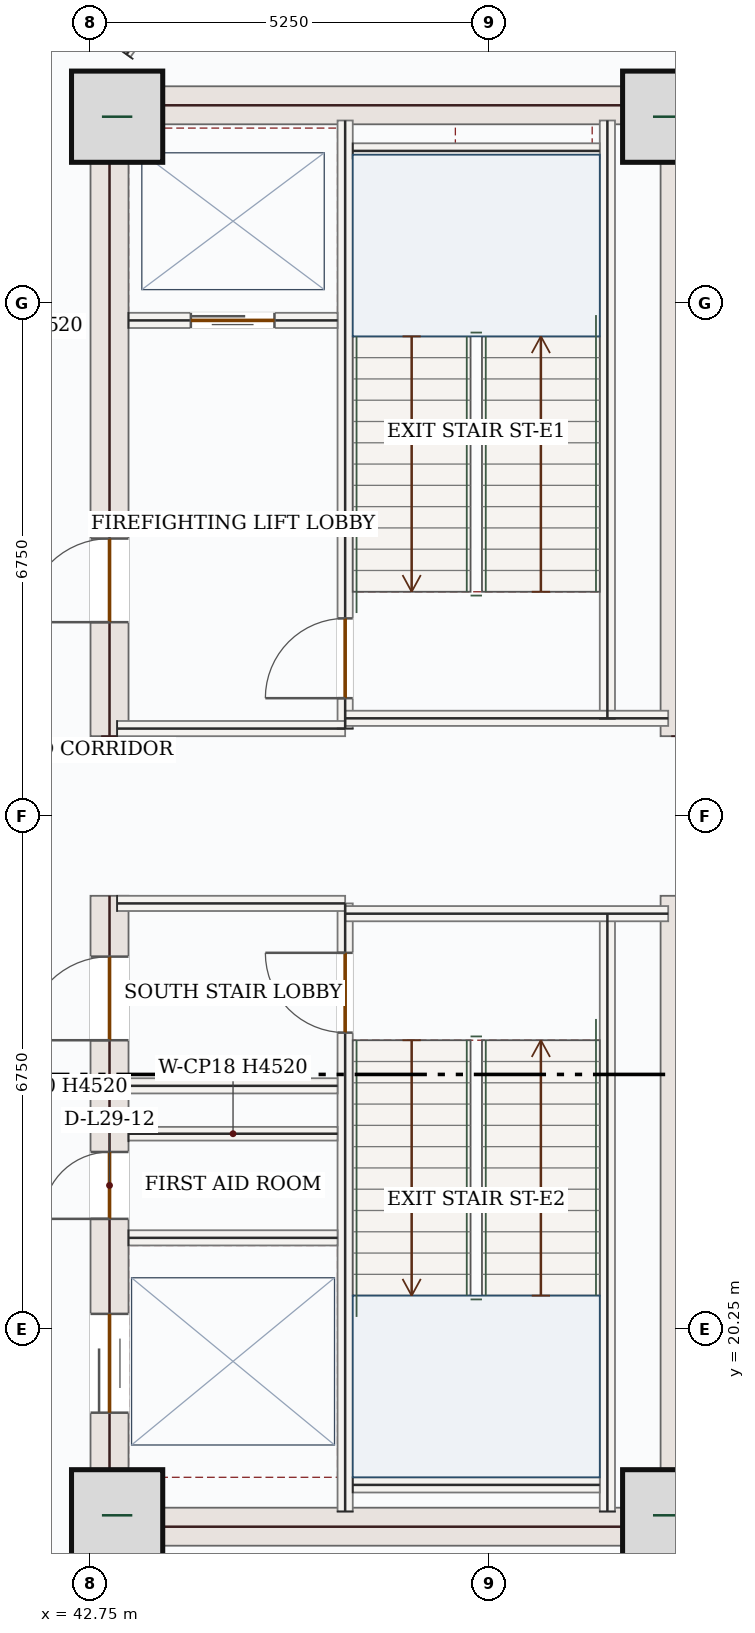
"""IFC4 building model, lengths in metres.
Left out: names, types, materials, properties, quantities, classifications, styles, units other than length and angle.
Written with IfcOpenShell. Run it as: python <this file> out.ifc"""

import sys

from ifc_helpers import new_model, si_unit, direction, frame, frame_2d, origin, origin_2d, place, context, subcontext, project, spatial, rectangle, extrude, source, transform, mapped, element, fill, save


model = new_model("IFC4")
c1 = context("Model", 3, precision=1e-05, world=origin(), true_north=direction((0.0, 1.0)))
c2 = subcontext(c1, "Body", "Model", "MODEL_VIEW")
j1 = project(units=[si_unit("LENGTHUNIT", "METRE"), si_unit("PLANEANGLEUNIT", "RADIAN")], contexts=[c1])
p1 = place(None, origin())
s1 = spatial("IfcSite", under=j1, at=p1, CompositionType="ELEMENT")
p2 = place(p1, origin())
s2 = spatial("IfcBuilding", under=s1, at=p2, CompositionType="ELEMENT")
p3 = place(p2, frame((0.0, 0.0, 130.8)))
s3 = spatial("IfcBuildingStorey", under=s2, at=p3, CompositionType="ELEMENT", Elevation=130.8)
p4 = place(p3, frame((43.0, 17.4, 0.0), z_axis=(0.0, 0.0, 1.0), x_axis=(0.0, 1.0, 0.0)))
e1 = element("IfcWall", 1, at=p4, inside=s3, PredefinedType="SHEAR", context=c2, shape_type="SweptSolid", body=[
    extrude(rectangle(XDim=8.55, YDim=0.5, at=frame_2d((4.275, 0.0))), origin(), (0.0, 0.0, 1.0), 4.52),
])
p5 = place(p4, frame((6.65, 0.0, 0.0)))
e2 = element("IfcOpeningElement", 2, at=p5, cuts=e1, PredefinedType="OPENING", context=c2, shape_type="SweptSolid", body=[
    extrude(rectangle(XDim=1.1, YDim=2.2, at=frame_2d((0.55, 1.1))), frame((0.0, 0.26, 0.0), z_axis=(0.0, -1.0, 0.0), x_axis=(1.0, 0.0, 0.0)), (0.0, 0.0, 1.0), 0.52),
])
p6 = place(p4, frame((1.75, 0.0, 0.0)))
e3 = element("IfcOpeningElement", 3, at=p6, cuts=e1, PredefinedType="OPENING", context=c2, shape_type="SweptSolid", body=[
    extrude(rectangle(XDim=1.3, YDim=2.2, at=frame_2d((0.65, 1.1))), frame((0.0, 0.26, 0.0), z_axis=(0.0, -1.0, 0.0), x_axis=(1.0, 0.0, 0.0)), (0.0, 0.0, 1.0), 0.52),
])
p7 = place(p4, frame((4.3, 0.0, 0.0)))
e4 = element("IfcOpeningElement", 4, at=p7, cuts=e1, PredefinedType="OPENING", context=c2, shape_type="SweptSolid", body=[
    extrude(rectangle(XDim=0.88, YDim=2.1, at=frame_2d((0.44, 1.05))), frame((0.0, 0.26, 0.0), z_axis=(0.0, -1.0, 0.0), x_axis=(1.0, 0.0, 0.0)), (0.0, 0.0, 1.0), 0.52),
])
p8 = place(p3, frame((43.0, 28.05, 0.0), z_axis=(0.0, 0.0, 1.0), x_axis=(0.0, 1.0, 0.0)))
e5 = element("IfcWall", 5, at=p8, inside=s3, PredefinedType="SHEAR", context=c2, shape_type="SweptSolid", body=[
    extrude(rectangle(XDim=8.55, YDim=0.5, at=frame_2d((4.275, 0.0))), origin(), (0.0, 0.0, 1.0), 4.52),
])
p9 = place(p8, frame((1.5, 0.0, 0.0)))
e6 = element("IfcOpeningElement", 6, at=p9, cuts=e5, PredefinedType="OPENING", context=c2, shape_type="SweptSolid", body=[
    extrude(rectangle(XDim=1.1, YDim=2.2, at=frame_2d((0.55, 1.1))), frame((0.0, 0.26, 0.0), z_axis=(0.0, -1.0, 0.0), x_axis=(1.0, 0.0, 0.0)), (0.0, 0.0, 1.0), 0.52),
])
m1 = source(origin(), c2, "Body", "SweptSolid", [
    extrude(rectangle(XDim=8.55, YDim=0.5, at=frame_2d((4.275, 0.0))), origin(), (0.0, 0.0, 1.0), 4.52),
])
for number, where, z_axis, x_axis in (
    (7, (50.5, 17.4, 0.0), (0.0, 0.0, 1.0), (0.0, 1.0, 0.0)),
    (8, (50.5, 28.05, 0.0), (0.0, 0.0, 1.0), (0.0, 1.0, 0.0)),
):
    element("IfcWall", number, at=place(p3, frame(where, z_axis=z_axis, x_axis=x_axis)), inside=s3, PredefinedType="SHEAR", context=c2, shape_type="MappedRepresentation", body=[
        mapped(m1, transform((0.0, 0.0, 0.0), x_axis=(1.0, 0.0, 0.0), y_axis=(0.0, 1.0, 0.0), z_axis=(0.0, 0.0, 1.0), scale=1.0)),
    ])
m2 = source(origin(), c2, "Body", "SweptSolid", [
    extrude(rectangle(XDim=7.0, YDim=0.5, at=frame_2d((3.5, 0.0))), origin(), (0.0, 0.0, 1.0), 4.52),
])
for number, where, z_axis, x_axis in (
    (9, (43.25, 17.65, 0.0), (0.0, 0.0, 1.0), (1.0, 0.0, 0.0)),
    (10, (43.25, 36.35, 0.0), (0.0, 0.0, 1.0), (1.0, 0.0, 0.0)),
):
    element("IfcWall", number, at=place(p3, frame(where, z_axis=z_axis, x_axis=x_axis)), inside=s3, PredefinedType="SHEAR", context=c2, shape_type="MappedRepresentation", body=[
        mapped(m2, transform((0.0, 0.0, 0.0), x_axis=(1.0, 0.0, 0.0), y_axis=(0.0, 1.0, 0.0), z_axis=(0.0, 0.0, 1.0), scale=1.0)),
    ])
m3 = source(origin(), c2, "Body", "SweptSolid", [
    extrude(rectangle(XDim=1.2, YDim=1.2, at=origin_2d()), origin(), (0.0, 0.0, 1.0), 4.8),
])
for number, where, z_axis, x_axis in (
    (11, (43.1, 17.8, 0.0), (0.0, 0.0, 1.0), (1.0, 0.0, 0.0)),
    (12, (50.35, 17.8, 0.0), (0.0, 0.0, 1.0), (1.0, 0.0, 0.0)),
    (13, (43.1, 36.2, 0.0), (0.0, 0.0, 1.0), (1.0, 0.0, 0.0)),
    (14, (50.35, 36.2, 0.0), (0.0, 0.0, 1.0), (1.0, 0.0, 0.0)),
):
    element("IfcColumn", number, at=place(p3, frame(where, z_axis=z_axis, x_axis=x_axis)), inside=s3, PredefinedType="COLUMN", context=c2, shape_type="MappedRepresentation", body=[
        mapped(m3, transform((0.0, 0.0, 0.0), x_axis=(1.0, 0.0, 0.0), y_axis=(0.0, 1.0, 0.0), z_axis=(0.0, 0.0, 1.0), scale=1.0)),
    ])
m4 = source(origin(), c2, "Body", "SweptSolid", [
    extrude(rectangle(XDim=5.258, YDim=0.28, at=frame_2d((2.629, 0.0))), origin(), (0.0, 0.0, 1.0), 4.52),
])
p10 = place(p3, frame((53.06, 18.458, 0.0), z_axis=(0.0, 0.0, 1.0), x_axis=(-0.707106781187, -0.707106781187, 0.0)))
e15 = element("IfcWall", 15, at=p10, inside=s3, PredefinedType="SOLIDWALL", context=c2, shape_type="MappedRepresentation", body=[
    mapped(m4, transform((0.0, 0.0, 0.0), x_axis=(1.0, 0.0, 0.0), y_axis=(0.0, 1.0, 0.0), z_axis=(0.0, 0.0, 1.0), scale=1.0)),
])
m5 = source(origin(), c2, "Body", "SweptSolid", [
    extrude(rectangle(XDim=4.11, YDim=0.28, at=frame_2d((2.055, 0.0))), origin(), (0.0, 0.0, 1.0), 4.52),
])
p11 = place(p3, frame((49.342, 39.26, 0.0), z_axis=(0.0, 0.0, 1.0), x_axis=(0.707106781187, -0.707106781187, 0.0)))
e16 = element("IfcWall", 16, at=p11, inside=s3, PredefinedType="SOLIDWALL", context=c2, shape_type="MappedRepresentation", body=[
    mapped(m5, transform((0.0, 0.0, 0.0), x_axis=(1.0, 0.0, 0.0), y_axis=(0.0, 1.0, 0.0), z_axis=(0.0, 0.0, 1.0), scale=1.0)),
])
m6 = source(origin(), c2, "Body", "SweptSolid", [
    extrude(rectangle(XDim=7.87, YDim=0.2, at=frame_2d((3.935, 0.0))), origin(), (0.0, 0.0, 1.0), 4.52),
])
for number, where, z_axis, x_axis in (
    (17, (49.55, 17.85, 0.0), (0.0, 0.0, 1.0), (0.0, 1.0, 0.0)),
    (18, (49.55, 28.28, 0.0), (0.0, 0.0, 1.0), (0.0, 1.0, 0.0)),
):
    element("IfcWall", number, at=place(p3, frame(where, z_axis=z_axis, x_axis=x_axis)), inside=s3, PredefinedType="SOLIDWALL", context=c2, shape_type="MappedRepresentation", body=[
        mapped(m6, transform((0.0, 0.0, 0.0), x_axis=(1.0, 0.0, 0.0), y_axis=(0.0, 1.0, 0.0), z_axis=(0.0, 0.0, 1.0), scale=1.0)),
    ])
p12 = place(p3, frame((46.1, 17.85, 0.0), z_axis=(0.0, 0.0, 1.0), x_axis=(0.0, 1.0, 0.0)))
e19 = element("IfcWall", 19, at=p12, inside=s3, PredefinedType="SOLIDWALL", context=c2, shape_type="SweptSolid", body=[
    extrude(rectangle(XDim=8.0, YDim=0.2, at=frame_2d((4.0, 0.0))), origin(), (0.0, 0.0, 1.0), 4.52),
])
p13 = place(p12, frame((6.3, 0.0, 0.0)))
e20 = element("IfcOpeningElement", 20, at=p13, cuts=e19, PredefinedType="OPENING", context=c2, shape_type="SweptSolid", body=[
    extrude(rectangle(XDim=1.05, YDim=2.15, at=frame_2d((0.525, 1.075))), frame((0.0, 0.11, 0.0), z_axis=(0.0, -1.0, 0.0), x_axis=(1.0, 0.0, 0.0)), (0.0, 0.0, 1.0), 0.22),
])
p14 = place(p3, frame((46.1, 28.15, 0.0), z_axis=(0.0, 0.0, 1.0), x_axis=(0.0, 1.0, 0.0)))
e21 = element("IfcWall", 21, at=p14, inside=s3, PredefinedType="SOLIDWALL", context=c2, shape_type="SweptSolid", body=[
    extrude(rectangle(XDim=8.0, YDim=0.2, at=frame_2d((4.0, 0.0))), origin(), (0.0, 0.0, 1.0), 4.52),
])
p15 = place(p14, frame((0.4, 0.0, 0.0)))
e22 = element("IfcOpeningElement", 22, at=p15, cuts=e21, PredefinedType="OPENING", context=c2, shape_type="SweptSolid", body=[
    extrude(rectangle(XDim=1.05, YDim=2.15, at=frame_2d((0.525, 1.075))), frame((0.0, 0.11, 0.0), z_axis=(0.0, -1.0, 0.0), x_axis=(1.0, 0.0, 0.0)), (0.0, 0.0, 1.0), 0.22),
])
m7 = source(origin(), c2, "Body", "SweptSolid", [
    extrude(rectangle(XDim=3.0, YDim=0.2, at=frame_2d((1.5, 0.0))), origin(), (0.0, 0.0, 1.0), 4.52),
])
p16 = place(p3, frame((43.1, 25.85, 0.0), z_axis=(0.0, 0.0, 1.0), x_axis=(1.0, 0.0, 0.0)))
e23 = element("IfcWall", 23, at=p16, inside=s3, PredefinedType="SOLIDWALL", context=c2, shape_type="MappedRepresentation", body=[
    mapped(m7, transform((0.0, 0.0, 0.0), x_axis=(1.0, 0.0, 0.0), y_axis=(0.0, 1.0, 0.0), z_axis=(0.0, 0.0, 1.0), scale=1.0)),
])
m8 = source(origin(), c2, "Body", "SweptSolid", [
    extrude(rectangle(XDim=4.25, YDim=0.2, at=frame_2d((2.125, 0.0))), origin(), (0.0, 0.0, 1.0), 4.52),
])
p17 = place(p3, frame((46.1, 25.715, 0.0), z_axis=(0.0, 0.0, 1.0), x_axis=(1.0, 0.0, 0.0)))
e24 = element("IfcWall", 24, at=p17, inside=s3, PredefinedType="SOLIDWALL", context=c2, shape_type="MappedRepresentation", body=[
    mapped(m8, transform((0.0, 0.0, 0.0), x_axis=(1.0, 0.0, 0.0), y_axis=(0.0, 1.0, 0.0), z_axis=(0.0, 0.0, 1.0), scale=1.0)),
])
p18 = place(p3, frame((43.1, 28.15, 0.0), z_axis=(0.0, 0.0, 1.0), x_axis=(1.0, 0.0, 0.0)))
e25 = element("IfcWall", 25, at=p18, inside=s3, PredefinedType="SOLIDWALL", context=c2, shape_type="MappedRepresentation", body=[
    mapped(m7, transform((0.0, 0.0, 0.0), x_axis=(1.0, 0.0, 0.0), y_axis=(0.0, 1.0, 0.0), z_axis=(0.0, 0.0, 1.0), scale=1.0)),
])
p19 = place(p3, frame((46.1, 28.285, 0.0), z_axis=(0.0, 0.0, 1.0), x_axis=(1.0, 0.0, 0.0)))
e26 = element("IfcWall", 26, at=p19, inside=s3, PredefinedType="SOLIDWALL", context=c2, shape_type="MappedRepresentation", body=[
    mapped(m8, transform((0.0, 0.0, 0.0), x_axis=(1.0, 0.0, 0.0), y_axis=(0.0, 1.0, 0.0), z_axis=(0.0, 0.0, 1.0), scale=1.0)),
])
m9 = source(origin(), c2, "Body", "SweptSolid", [
    extrude(rectangle(XDim=3.25, YDim=0.2, at=frame_2d((1.625, 0.0))), origin(), (0.0, 0.0, 1.0), 4.52),
])
for number, where, z_axis, x_axis in (
    (27, (46.2, 35.75, 0.0), (0.0, 0.0, 1.0), (1.0, 0.0, 0.0)),
    (28, (46.2, 18.2, 0.0), (0.0, 0.0, 1.0), (1.0, 0.0, 0.0)),
):
    element("IfcWall", number, at=place(p3, frame(where, z_axis=z_axis, x_axis=x_axis)), inside=s3, PredefinedType="SOLIDWALL", context=c2, shape_type="MappedRepresentation", body=[
        mapped(m9, transform((0.0, 0.0, 0.0), x_axis=(1.0, 0.0, 0.0), y_axis=(0.0, 1.0, 0.0), z_axis=(0.0, 0.0, 1.0), scale=1.0)),
    ])
p20 = place(p3, frame((43.25, 33.52, 0.0), z_axis=(0.0, 0.0, 1.0), x_axis=(1.0, 0.0, 0.0)))
e29 = element("IfcWall", 29, at=p20, inside=s3, PredefinedType="SOLIDWALL", context=c2, shape_type="SweptSolid", body=[
    extrude(rectangle(XDim=2.75, YDim=0.2, at=frame_2d((1.375, 0.0))), origin(), (0.0, 0.0, 1.0), 4.52),
])
p21 = place(p20, frame((0.82, 0.0, 0.0)))
e30 = element("IfcOpeningElement", 30, at=p21, cuts=e29, PredefinedType="OPENING", context=c2, shape_type="SweptSolid", body=[
    extrude(rectangle(XDim=1.1, YDim=2.15, at=frame_2d((0.55, 1.075))), frame((0.0, 0.11, 0.0), z_axis=(0.0, -1.0, 0.0), x_axis=(1.0, 0.0, 0.0)), (0.0, 0.0, 1.0), 0.22),
])
m10 = source(origin(), c2, "Body", "SweptSolid", [
    extrude(rectangle(XDim=2.75, YDim=0.2, at=frame_2d((1.375, 0.0))), origin(), (0.0, 0.0, 1.0), 4.52),
])
for number, where, z_axis, x_axis in (
    (31, (43.25, 23.45, 0.0), (0.0, 0.0, 1.0), (1.0, 0.0, 0.0)),
    (32, (43.25, 21.45, 0.0), (0.0, 0.0, 1.0), (1.0, 0.0, 0.0)),
):
    element("IfcWall", number, at=place(p3, frame(where, z_axis=z_axis, x_axis=x_axis)), inside=s3, PredefinedType="SOLIDWALL", context=c2, shape_type="MappedRepresentation", body=[
        mapped(m10, transform((0.0, 0.0, 0.0), x_axis=(1.0, 0.0, 0.0), y_axis=(0.0, 1.0, 0.0), z_axis=(0.0, 0.0, 1.0), scale=1.0)),
    ])
m11 = source(origin(), c2, "Body", "SweptSolid", [
    extrude(rectangle(XDim=2.75, YDim=0.18, at=frame_2d((1.375, 0.0))), origin(), (0.0, 0.0, 1.0), 4.52),
])
p22 = place(p3, frame((43.25, 22.82, 0.0), z_axis=(0.0, 0.0, 1.0), x_axis=(1.0, 0.0, 0.0)))
e33 = element("IfcWall", 33, at=p22, inside=s3, PredefinedType="PARTITIONING", context=c2, shape_type="MappedRepresentation", body=[
    mapped(m11, transform((0.0, 0.0, 0.0), x_axis=(1.0, 0.0, 0.0), y_axis=(0.0, 1.0, 0.0), z_axis=(0.0, 0.0, 1.0), scale=1.0)),
])
m12 = source(origin(), c2, "Body", "SweptSolid", [
    extrude(rectangle(XDim=2.577, YDim=0.125, at=frame_2d((1.289, 0.0))), origin(), (0.0, 0.0, 1.0), 4.52),
])
p23 = place(p3, frame((43.224, 37.02, 0.0), z_axis=(0.0, 0.0, 1.0), x_axis=(0.582286278149, 0.812983819199, 0.0)))
e34 = element("IfcWall", 34, at=p23, inside=s3, PredefinedType="PARTITIONING", context=c2, shape_type="MappedRepresentation", body=[
    mapped(m12, transform((0.0, 0.0, 0.0), x_axis=(1.0, 0.0, 0.0), y_axis=(0.0, 1.0, 0.0), z_axis=(0.0, 0.0, 1.0), scale=1.0)),
])
m13 = source(origin(), c2, "Body", "SweptSolid", [
    extrude(rectangle(XDim=1.05, YDim=2.15, at=frame_2d((0.525, 1.075))), frame((0.0, 0.025, 0.0), z_axis=(0.0, -1.0, 0.0), x_axis=(1.0, 0.0, 0.0)), (0.0, 0.0, 1.0), 0.05),
])
p24 = place(p15, origin())
e35 = element("IfcDoor", 35, at=p24, inside=s3, OperationType="SINGLE_SWING_LEFT", PredefinedType="DOOR", context=c2, shape_type="MappedRepresentation", body=[
    mapped(m13, transform((0.0, 0.0, 0.0), x_axis=(1.0, 0.0, 0.0), y_axis=(0.0, 1.0, 0.0), z_axis=(0.0, 0.0, 1.0), scale=1.0)),
])
fill(e22, e35)
p25 = place(p13, origin())
e36 = element("IfcDoor", 36, at=p25, inside=s3, OperationType="SINGLE_SWING_RIGHT", PredefinedType="DOOR", context=c2, shape_type="MappedRepresentation", body=[
    mapped(m13, transform((0.0, 0.0, 0.0), x_axis=(1.0, 0.0, 0.0), y_axis=(0.0, 1.0, 0.0), z_axis=(0.0, 0.0, 1.0), scale=1.0)),
])
fill(e20, e36)
m14 = source(origin(), c2, "Body", "SweptSolid", [
    extrude(rectangle(XDim=1.1, YDim=2.15, at=frame_2d((0.55, 1.075))), frame((0.0, 0.025, 0.0), z_axis=(0.0, -1.0, 0.0), x_axis=(1.0, 0.0, 0.0)), (0.0, 0.0, 1.0), 0.05),
])
p26 = place(p21, origin())
e37 = element("IfcDoor", 37, at=p26, inside=s3, OperationType="DOUBLE_DOOR_SLIDING", PredefinedType="DOOR", context=c2, shape_type="MappedRepresentation", body=[
    mapped(m14, transform((0.0, 0.0, 0.0), x_axis=(1.0, 0.0, 0.0), y_axis=(0.0, 1.0, 0.0), z_axis=(0.0, 0.0, 1.0), scale=1.0)),
])
fill(e30, e37)
m15 = source(origin(), c2, "Body", "SweptSolid", [
    extrude(rectangle(XDim=1.1, YDim=2.2, at=frame_2d((0.55, 1.1))), frame((0.0, 0.025, 0.0), z_axis=(0.0, -1.0, 0.0), x_axis=(1.0, 0.0, 0.0)), (0.0, 0.0, 1.0), 0.05),
])
p27 = place(p9, origin())
e38 = element("IfcDoor", 38, at=p27, inside=s3, OperationType="SINGLE_SWING_LEFT", PredefinedType="DOOR", context=c2, shape_type="MappedRepresentation", body=[
    mapped(m15, transform((0.0, 0.0, 0.0), x_axis=(1.0, 0.0, 0.0), y_axis=(0.0, 1.0, 0.0), z_axis=(0.0, 0.0, 1.0), scale=1.0)),
])
fill(e6, e38)
p28 = place(p5, origin())
e39 = element("IfcDoor", 39, at=p28, inside=s3, OperationType="SINGLE_SWING_LEFT", PredefinedType="DOOR", context=c2, shape_type="MappedRepresentation", body=[
    mapped(m15, transform((0.0, 0.0, 0.0), x_axis=(1.0, 0.0, 0.0), y_axis=(0.0, 1.0, 0.0), z_axis=(0.0, 0.0, 1.0), scale=1.0)),
])
fill(e2, e39)
m16 = source(origin(), c2, "Body", "SweptSolid", [
    extrude(rectangle(XDim=1.3, YDim=2.2, at=frame_2d((0.65, 1.1))), frame((0.0, 0.025, 0.0), z_axis=(0.0, -1.0, 0.0), x_axis=(1.0, 0.0, 0.0)), (0.0, 0.0, 1.0), 0.05),
])
p29 = place(p6, origin())
e40 = element("IfcDoor", 40, at=p29, inside=s3, OperationType="DOUBLE_DOOR_SLIDING", PredefinedType="DOOR", context=c2, shape_type="MappedRepresentation", body=[
    mapped(m16, transform((0.0, 0.0, 0.0), x_axis=(1.0, 0.0, 0.0), y_axis=(0.0, 1.0, 0.0), z_axis=(0.0, 0.0, 1.0), scale=1.0)),
])
fill(e3, e40)
m17 = source(origin(), c2, "Body", "SweptSolid", [
    extrude(rectangle(XDim=0.88, YDim=2.1, at=frame_2d((0.44, 1.05))), frame((0.0, 0.025, 0.0), z_axis=(0.0, -1.0, 0.0), x_axis=(1.0, 0.0, 0.0)), (0.0, 0.0, 1.0), 0.05),
])
p30 = place(p7, origin())
e41 = element("IfcDoor", 41, at=p30, inside=s3, OperationType="SINGLE_SWING_LEFT", PredefinedType="DOOR", context=c2, shape_type="MappedRepresentation", body=[
    mapped(m17, transform((0.0, 0.0, 0.0), x_axis=(1.0, 0.0, 0.0), y_axis=(0.0, 1.0, 0.0), z_axis=(0.0, 0.0, 1.0), scale=1.0)),
])
fill(e4, e41)
save(model, sys.argv[1])
